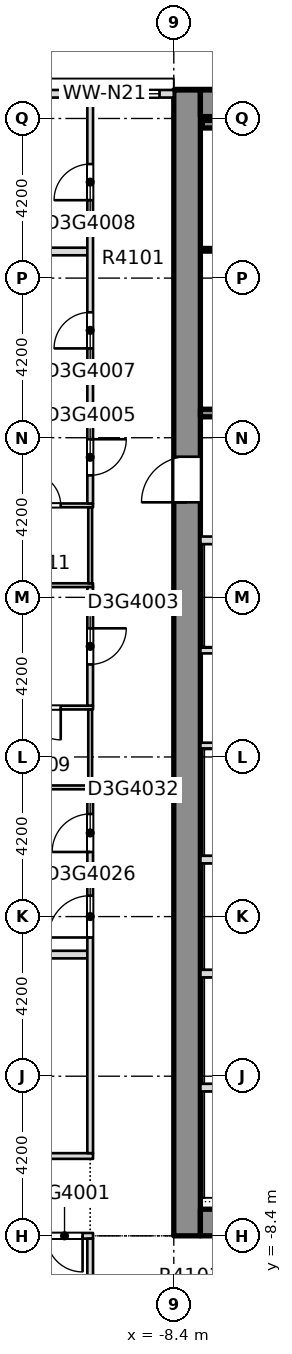
"""IFC4 building model, lengths in metres.
Left out: names, types, materials, properties, quantities, classifications, styles, units other than length and angle.
Written with IfcOpenShell. Run it as: python <this file> out.ifc"""

import sys

from ifc_helpers import new_model, si_unit, direction, frame, frame_2d, origin, place, context, subcontext, project, spatial, rectangle, extrude, element, fill, save


model = new_model("IFC4")
c1 = context("Model", 3, precision=1e-05, world=origin(), true_north=direction((0.0, 1.0)))
c2 = subcontext(c1, "Body", "Model", "MODEL_VIEW")
j1 = project(units=[si_unit("LENGTHUNIT", "METRE"), si_unit("PLANEANGLEUNIT", "RADIAN")], contexts=[c1])
p1 = place(None, origin())
s1 = spatial("IfcSite", under=j1, at=p1, CompositionType="ELEMENT")
p2 = place(p1, origin())
s2 = spatial("IfcBuilding", under=s1, at=p2, CompositionType="ELEMENT")
p3 = place(p2, frame((0.0, 0.0, 160.7)))
s3 = spatial("IfcBuildingStorey", under=s2, at=p3, CompositionType="ELEMENT", Elevation=160.7)
p4 = place(p3, frame((-8.05, -8.4, -0.4), z_axis=(0.0, 0.0, 1.0), x_axis=(0.0, 1.0, 0.0)))
e1 = element("IfcWall", 1, at=p4, inside=s3, PredefinedType="SOLIDWALL", context=c2, shape_type="SweptSolid", body=[
    extrude(rectangle(XDim=30.15, YDim=0.7, at=frame_2d((15.075, 0.0))), origin(), (0.0, 0.0, 1.0), 3.45),
])
p5 = place(p4, frame((19.3, 0.0, 0.4)))
e2 = element("IfcOpeningElement", 2, at=p5, cuts=e1, PredefinedType="OPENING", context=c2, shape_type="SweptSolid", body=[
    extrude(rectangle(XDim=1.2, YDim=2.1, at=frame_2d((0.6, 1.05))), frame((0.0, 0.36, 0.0), z_axis=(0.0, -1.0, 0.0), x_axis=(1.0, 0.0, 0.0)), (0.0, 0.0, 1.0), 0.72),
])
p6 = place(p3, frame((-7.7, -8.05, -0.4), z_axis=(0.0, 0.0, 1.0), x_axis=(1.0, 0.0, 0.0)))
e3 = element("IfcWall", 3, at=p6, inside=s3, PredefinedType="SHEAR", context=c2, shape_type="SweptSolid", body=[
    extrude(rectangle(XDim=15.4, YDim=0.7, at=frame_2d((7.7, 0.0))), origin(), (0.0, 0.0, 1.0), 3.45),
])
p7 = place(p6, frame((2.95, 0.0, 0.4)))
e4 = element("IfcOpeningElement", 4, at=p7, cuts=e3, PredefinedType="OPENING", context=c2, shape_type="SweptSolid", body=[
    extrude(rectangle(XDim=1.8, YDim=2.1, at=frame_2d((0.9, 1.05))), frame((0.0, 0.36, 0.0), z_axis=(0.0, -1.0, 0.0), x_axis=(1.0, 0.0, 0.0)), (0.0, 0.0, 1.0), 0.72),
])
p8 = place(p6, frame((10.65, 0.0, 0.4)))
e5 = element("IfcOpeningElement", 5, at=p8, cuts=e3, PredefinedType="OPENING", context=c2, shape_type="SweptSolid", body=[
    extrude(rectangle(XDim=1.8, YDim=2.1, at=frame_2d((0.9, 1.05))), frame((0.0, 0.36, 0.0), z_axis=(0.0, -1.0, 0.0), x_axis=(1.0, 0.0, 0.0)), (0.0, 0.0, 1.0), 0.72),
])
p9 = place(p3, frame((-7.7, 21.4, -0.4), z_axis=(0.0, 0.0, 1.0), x_axis=(1.0, 0.0, 0.0)))
e6 = element("IfcWall", 6, at=p9, inside=s3, PredefinedType="SHEAR", context=c2, shape_type="SweptSolid", body=[
    extrude(rectangle(XDim=15.4, YDim=0.7, at=frame_2d((7.7, 0.0))), origin(), (0.0, 0.0, 1.0), 3.45),
])
p10 = place(p3, frame((-21.55, -8.4, 0.0), z_axis=(0.0, 0.0, 1.0), x_axis=(1.0, 0.0, 0.0)))
e7 = element("IfcWall", 7, at=p10, inside=s3, PredefinedType="PARTITIONING", context=c2, shape_type="SweptSolid", body=[
    extrude(rectangle(XDim=11.025, YDim=0.15, at=frame_2d((5.513, 0.0))), origin(), (0.0, 0.0, 1.0), 3.05),
])
p11 = place(p10, frame((9.8, 0.0, 0.0)))
e8 = element("IfcOpeningElement", 8, at=p11, cuts=e7, PredefinedType="OPENING", context=c2, shape_type="SweptSolid", body=[
    extrude(rectangle(XDim=0.95, YDim=2.1, at=frame_2d((0.475, 1.05))), frame((0.0, 0.085, 0.0), z_axis=(0.0, -1.0, 0.0), x_axis=(1.0, 0.0, 0.0)), (0.0, 0.0, 1.0), 0.17),
])
p12 = place(p3, frame((-21.55, -6.3, 0.0), z_axis=(0.0, 0.0, 1.0), x_axis=(1.0, 0.0, 0.0)))
e9 = element("IfcWall", 9, at=p12, inside=s3, PredefinedType="PARTITIONING", context=c2, shape_type="SweptSolid", body=[
    extrude(rectangle(XDim=11.025, YDim=0.15, at=frame_2d((5.513, 0.0))), origin(), (0.0, 0.0, 1.0), 3.05),
])
p13 = place(p12, frame((1.75, 0.0, 0.0)))
e10 = element("IfcOpeningElement", 10, at=p13, cuts=e9, PredefinedType="OPENING", context=c2, shape_type="SweptSolid", body=[
    extrude(rectangle(XDim=1.0, YDim=2.1, at=frame_2d((0.5, 1.05))), frame((0.0, 0.085, 0.0), z_axis=(0.0, -1.0, 0.0), x_axis=(1.0, 0.0, 0.0)), (0.0, 0.0, 1.0), 0.17),
])
p14 = place(p12, frame((7.325, 0.0, 0.0)))
e11 = element("IfcOpeningElement", 11, at=p14, cuts=e9, PredefinedType="OPENING", context=c2, shape_type="SweptSolid", body=[
    extrude(rectangle(XDim=1.0, YDim=2.1, at=frame_2d((0.5, 1.05))), frame((0.0, 0.085, 0.0), z_axis=(0.0, -1.0, 0.0), x_axis=(1.0, 0.0, 0.0)), (0.0, 0.0, 1.0), 0.17),
])
for number, where, z_axis, x_axis in (
    (12, (-16.75, -1.0, 0.0), (0.0, 0.0, 1.0), (1.0, 0.0, 0.0)),
    (13, (-16.75, 1.0, 0.0), (0.0, 0.0, 1.0), (1.0, 0.0, 0.0)),
):
    element("IfcWall", number, at=place(p3, frame(where, z_axis=z_axis, x_axis=x_axis)), inside=s3, PredefinedType="PARTITIONING", context=c2, shape_type="SweptSolid", body=[
        extrude(rectangle(XDim=6.075, YDim=0.2, at=frame_2d((3.038, 0.0))), origin(), (0.0, 0.0, 1.0), 3.05),
    ])
p15 = place(p3, frame((-13.05, 3.4, 0.0), z_axis=(0.0, 0.0, 1.0), x_axis=(1.0, 0.0, 0.0)))
e14 = element("IfcWall", 14, at=p15, inside=s3, PredefinedType="PARTITIONING", context=c2, shape_type="SweptSolid", body=[
    extrude(rectangle(XDim=2.525, YDim=0.1, at=frame_2d((1.263, 0.0))), origin(), (0.0, 0.0, 1.0), 3.05),
])
p16 = place(p3, frame((-13.048, 5.5, 0.0), z_axis=(0.0, 0.0, 1.0), x_axis=(1.0, 0.0, 0.0)))
e15 = element("IfcWall", 15, at=p16, inside=s3, PredefinedType="PARTITIONING", context=c2, shape_type="SweptSolid", body=[
    extrude(rectangle(XDim=2.523, YDim=0.1, at=frame_2d((1.262, 0.0))), origin(), (0.0, 0.0, 1.0), 3.05),
])
p17 = place(p16, frame((0.823, 0.0, 0.0)))
e16 = element("IfcOpeningElement", 16, at=p17, cuts=e15, PredefinedType="OPENING", context=c2, shape_type="SweptSolid", body=[
    extrude(rectangle(XDim=0.85, YDim=2.1, at=frame_2d((0.425, 1.05))), frame((0.0, 0.06, 0.0), z_axis=(0.0, -1.0, 0.0), x_axis=(1.0, 0.0, 0.0)), (0.0, 0.0, 1.0), 0.12),
])
p18 = place(p3, frame((-13.05, 8.72, 0.0), z_axis=(0.0, 0.0, 1.0), x_axis=(1.0, 0.0, 0.0)))
e17 = element("IfcWall", 17, at=p18, inside=s3, PredefinedType="PARTITIONING", context=c2, shape_type="SweptSolid", body=[
    extrude(rectangle(XDim=2.525, YDim=0.1, at=frame_2d((1.263, 0.0))), origin(), (0.0, 0.0, 1.0), 3.05),
])
p19 = place(p3, frame((-13.05, 10.82, 0.0), z_axis=(0.0, 0.0, 1.0), x_axis=(1.0, 0.0, 0.0)))
e18 = element("IfcWall", 18, at=p19, inside=s3, PredefinedType="PARTITIONING", context=c2, shape_type="SweptSolid", body=[
    extrude(rectangle(XDim=2.525, YDim=0.1, at=frame_2d((1.263, 0.0))), origin(), (0.0, 0.0, 1.0), 3.05),
])
p20 = place(p19, frame((0.825, 0.0, 0.0)))
e19 = element("IfcOpeningElement", 19, at=p20, cuts=e18, PredefinedType="OPENING", context=c2, shape_type="SweptSolid", body=[
    extrude(rectangle(XDim=0.85, YDim=2.1, at=frame_2d((0.425, 1.05))), frame((0.0, 0.06, 0.0), z_axis=(0.0, -1.0, 0.0), x_axis=(1.0, 0.0, 0.0)), (0.0, 0.0, 1.0), 0.12),
])
for number, where, z_axis, x_axis in (
    (20, (-13.15, 13.35, 0.0), (0.0, 0.0, 1.0), (1.0, 0.0, 0.0)),
    (21, (-13.15, 17.5, 0.0), (0.0, 0.0, 1.0), (1.0, 0.0, 0.0)),
):
    element("IfcWall", number, at=place(p3, frame(where, z_axis=z_axis, x_axis=x_axis)), inside=s3, PredefinedType="PARTITIONING", context=c2, shape_type="SweptSolid", body=[
        extrude(rectangle(XDim=2.475, YDim=0.2, at=frame_2d((1.237, 0.0))), origin(), (0.0, 0.0, 1.0), 3.05),
    ])
p21 = place(p3, frame((-10.6, -10.4, 0.0), z_axis=(0.0, 0.0, 1.0), x_axis=(0.0, 1.0, 0.0)))
e22 = element("IfcWall", 22, at=p21, inside=s3, PredefinedType="PARTITIONING", context=c2, shape_type="SweptSolid", body=[
    extrude(rectangle(XDim=1.925, YDim=0.15, at=frame_2d((0.962, 0.0))), origin(), (0.0, 0.0, 1.0), 3.05),
])
p22 = place(p3, frame((-10.6, -6.225, 0.0), z_axis=(0.0, 0.0, 1.0), x_axis=(0.0, 1.0, 0.0)))
e23 = element("IfcWall", 23, at=p22, inside=s3, PredefinedType="PARTITIONING", context=c2, shape_type="SweptSolid", body=[
    extrude(rectangle(XDim=9.575, YDim=0.15, at=frame_2d((4.788, 0.0))), origin(), (0.0, 0.0, 1.0), 3.05),
])
p23 = place(p22, frame((5.675, 0.0, 0.0)))
e24 = element("IfcOpeningElement", 24, at=p23, cuts=e23, PredefinedType="OPENING", context=c2, shape_type="SweptSolid", body=[
    extrude(rectangle(XDim=1.1, YDim=2.1, at=frame_2d((0.55, 1.05))), frame((0.0, 0.085, 0.0), z_axis=(0.0, -1.0, 0.0), x_axis=(1.0, 0.0, 0.0)), (0.0, 0.0, 1.0), 0.17),
])
p24 = place(p22, frame((7.925, 0.0, 0.0)))
e25 = element("IfcOpeningElement", 25, at=p24, cuts=e23, PredefinedType="OPENING", context=c2, shape_type="SweptSolid", body=[
    extrude(rectangle(XDim=1.0, YDim=2.1, at=frame_2d((0.5, 1.05))), frame((0.0, 0.085, 0.0), z_axis=(0.0, -1.0, 0.0), x_axis=(1.0, 0.0, 0.0)), (0.0, 0.0, 1.0), 0.17),
])
p25 = place(p3, frame((-10.6, 3.45, 0.0), z_axis=(0.0, 0.0, 1.0), x_axis=(0.0, 1.0, 0.0)))
e26 = element("IfcWall", 26, at=p25, inside=s3, PredefinedType="PARTITIONING", context=c2, shape_type="SweptSolid", body=[
    extrude(rectangle(XDim=2.0, YDim=0.1, at=frame_2d((1.0, 0.0))), origin(), (0.0, 0.0, 1.0), 3.05),
])
p26 = place(p3, frame((-10.6, 5.55, 0.0), z_axis=(0.0, 0.0, 1.0), x_axis=(0.0, 1.0, 0.0)))
e27 = element("IfcWall", 27, at=p26, inside=s3, PredefinedType="PARTITIONING", context=c2, shape_type="SweptSolid", body=[
    extrude(rectangle(XDim=3.12, YDim=0.15, at=frame_2d((1.56, 0.0))), origin(), (0.0, 0.0, 1.0), 3.05),
])
p27 = place(p26, frame((1.085, 0.0, 0.0)))
e28 = element("IfcOpeningElement", 28, at=p27, cuts=e27, PredefinedType="OPENING", context=c2, shape_type="SweptSolid", body=[
    extrude(rectangle(XDim=0.95, YDim=2.1, at=frame_2d((0.475, 1.05))), frame((0.0, 0.085, 0.0), z_axis=(0.0, -1.0, 0.0), x_axis=(1.0, 0.0, 0.0)), (0.0, 0.0, 1.0), 0.17),
])
p28 = place(p3, frame((-10.6, 8.77, 0.0), z_axis=(0.0, 0.0, 1.0), x_axis=(0.0, 1.0, 0.0)))
e29 = element("IfcWall", 29, at=p28, inside=s3, PredefinedType="PARTITIONING", context=c2, shape_type="SweptSolid", body=[
    extrude(rectangle(XDim=2.0, YDim=0.1, at=frame_2d((1.0, 0.0))), origin(), (0.0, 0.0, 1.0), 3.05),
])
p29 = place(p3, frame((-10.6, 10.87, 0.0), z_axis=(0.0, 0.0, 1.0), x_axis=(0.0, 1.0, 0.0)))
e30 = element("IfcWall", 30, at=p29, inside=s3, PredefinedType="PARTITIONING", context=c2, shape_type="SweptSolid", body=[
    extrude(rectangle(XDim=10.68, YDim=0.15, at=frame_2d((5.34, 0.0))), origin(), (0.0, 0.0, 1.0), 3.05),
])
p30 = place(p29, frame((0.74, 0.0, 0.0)))
e31 = element("IfcOpeningElement", 31, at=p30, cuts=e30, PredefinedType="OPENING", context=c2, shape_type="SweptSolid", body=[
    extrude(rectangle(XDim=0.95, YDim=2.1, at=frame_2d((0.475, 1.05))), frame((0.0, 0.085, 0.0), z_axis=(0.0, -1.0, 0.0), x_axis=(1.0, 0.0, 0.0)), (0.0, 0.0, 1.0), 0.17),
])
p31 = place(p29, frame((4.08, 0.0, 0.0)))
e32 = element("IfcOpeningElement", 32, at=p31, cuts=e30, PredefinedType="OPENING", context=c2, shape_type="SweptSolid", body=[
    extrude(rectangle(XDim=0.95, YDim=2.1, at=frame_2d((0.475, 1.05))), frame((0.0, 0.085, 0.0), z_axis=(0.0, -1.0, 0.0), x_axis=(1.0, 0.0, 0.0)), (0.0, 0.0, 1.0), 0.17),
])
p32 = place(p29, frame((7.98, 0.0, 0.0)))
e33 = element("IfcOpeningElement", 33, at=p32, cuts=e30, PredefinedType="OPENING", context=c2, shape_type="SweptSolid", body=[
    extrude(rectangle(XDim=0.95, YDim=2.1, at=frame_2d((0.475, 1.05))), frame((0.0, 0.085, 0.0), z_axis=(0.0, -1.0, 0.0), x_axis=(1.0, 0.0, 0.0)), (0.0, 0.0, 1.0), 0.17),
])
p33 = place(p3, frame((-8.4, 21.65, 0.0), z_axis=(0.0, 0.0, 1.0), x_axis=(-1.0, 0.0, 0.0)))
e34 = element("IfcWall", 34, at=p33, inside=s3, PredefinedType="STANDARD", context=c2, shape_type="SweptSolid", body=[
    extrude(rectangle(XDim=3.65, YDim=0.2, at=frame_2d((1.825, 0.0))), origin(), (0.0, 0.0, 1.0), 3.05),
])
p34 = place(p33, frame((0.375, 0.0, 0.2)))
e35 = element("IfcOpeningElement", 35, at=p34, cuts=e34, PredefinedType="OPENING", context=c2, shape_type="SweptSolid", body=[
    extrude(rectangle(XDim=1.8, YDim=2.65, at=frame_2d((0.9, 1.325))), frame((0.0, 0.11, 0.0), z_axis=(0.0, -1.0, 0.0), x_axis=(1.0, 0.0, 0.0)), (0.0, 0.0, 1.0), 0.22),
])
for number, where, z_axis, x_axis in (
    (36, (-7.699, -4.5, 0.0), (0.0, 0.0, 1.0), (1.0, 0.0, 0.0)),
    (37, (-7.699, -1.5, 0.0), (0.0, 0.0, 1.0), (1.0, 0.0, 0.0)),
    (38, (-7.699, 1.5, 0.0), (0.0, 0.0, 1.0), (1.0, 0.0, 0.0)),
):
    element("IfcWall", number, at=place(p3, frame(where, z_axis=z_axis, x_axis=x_axis)), inside=s3, PredefinedType="PARTITIONING", context=c2, shape_type="SweptSolid", body=[
        extrude(rectangle(XDim=2.124, YDim=0.2, at=frame_2d((1.062, 0.0))), origin(), (0.0, 0.0, 1.0), 3.05),
    ])
p35 = place(p3, frame((-7.699, 4.5, 0.0), z_axis=(0.0, 0.0, 1.0), x_axis=(1.0, 0.0, 0.0)))
e39 = element("IfcWall", 39, at=p35, inside=s3, PredefinedType="PARTITIONING", context=c2, shape_type="SweptSolid", body=[
    extrude(rectangle(XDim=2.274, YDim=0.15, at=frame_2d((1.137, 0.0))), origin(), (0.0, 0.0, 1.0), 3.05),
])
p36 = place(p3, frame((-7.699, 7.0, 0.0), z_axis=(0.0, 0.0, 1.0), x_axis=(1.0, 0.0, 0.0)))
e40 = element("IfcWall", 40, at=p36, inside=s3, PredefinedType="PARTITIONING", context=c2, shape_type="SweptSolid", body=[
    extrude(rectangle(XDim=15.398, YDim=0.15, at=frame_2d((7.699, 0.0))), origin(), (0.0, 0.0, 1.0), 3.05),
])
p37 = place(p36, frame((6.999, 0.0, 0.0)))
e41 = element("IfcOpeningElement", 41, at=p37, cuts=e40, PredefinedType="OPENING", context=c2, shape_type="SweptSolid", body=[
    extrude(rectangle(XDim=1.4, YDim=2.1, at=frame_2d((0.7, 1.05))), frame((0.0, 0.085, 0.0), z_axis=(0.0, -1.0, 0.0), x_axis=(1.0, 0.0, 0.0)), (0.0, 0.0, 1.0), 0.17),
])
p38 = place(p3, frame((-7.699, 9.9, 0.0), z_axis=(0.0, 0.0, 1.0), x_axis=(1.0, 0.0, 0.0)))
e42 = element("IfcWall", 42, at=p38, inside=s3, PredefinedType="PARTITIONING", context=c2, shape_type="SweptSolid", body=[
    extrude(rectangle(XDim=4.099, YDim=0.2, at=frame_2d((2.049, 0.0))), origin(), (0.0, 0.0, 1.0), 3.05),
])
p39 = place(p38, frame((0.749, 0.0, 0.0)))
e43 = element("IfcOpeningElement", 43, at=p39, cuts=e42, PredefinedType="OPENING", context=c2, shape_type="SweptSolid", body=[
    extrude(rectangle(XDim=1.1, YDim=2.1, at=frame_2d((0.55, 1.05))), frame((0.0, 0.11, 0.0), z_axis=(0.0, -1.0, 0.0), x_axis=(1.0, 0.0, 0.0)), (0.0, 0.0, 1.0), 0.22),
])
p40 = place(p3, frame((-7.699, 13.25, 0.0), z_axis=(0.0, 0.0, 1.0), x_axis=(1.0, 0.0, 0.0)))
e44 = element("IfcWall", 44, at=p40, inside=s3, PredefinedType="SOLIDWALL", context=c2, shape_type="SweptSolid", body=[
    extrude(rectangle(XDim=4.274, YDim=0.2, at=frame_2d((2.137, 0.0))), origin(), (0.0, 0.0, 1.0), 3.05),
])
p41 = place(p40, frame((1.249, 0.0, 0.0)))
e45 = element("IfcOpeningElement", 45, at=p41, cuts=e44, PredefinedType="OPENING", context=c2, shape_type="SweptSolid", body=[
    extrude(rectangle(XDim=1.2, YDim=2.1, at=frame_2d((0.6, 1.05))), frame((0.0, 0.11, 0.0), z_axis=(0.0, -1.0, 0.0), x_axis=(1.0, 0.0, 0.0)), (0.0, 0.0, 1.0), 0.22),
])
p42 = place(p3, frame((-7.65, 20.85, 0.0), z_axis=(0.0, 0.0, 1.0), x_axis=(1.0, 0.0, 0.0)))
e46 = element("IfcWall", 46, at=p42, inside=s3, PredefinedType="SOLIDWALL", context=c2, shape_type="SweptSolid", body=[
    extrude(rectangle(XDim=3.5, YDim=0.2, at=frame_2d((1.75, 0.0))), origin(), (0.0, 0.0, 1.0), 3.05),
])
p43 = place(p11, origin())
e47 = element("IfcDoor", 47, at=p43, inside=s3, OperationType="SINGLE_SWING_RIGHT", PredefinedType="DOOR", context=c2, shape_type="SweptSolid", body=[
    extrude(rectangle(XDim=0.95, YDim=2.1, at=frame_2d((0.475, 1.05))), frame((0.0, 0.025, 0.0), z_axis=(0.0, -1.0, 0.0), x_axis=(1.0, 0.0, 0.0)), (0.0, 0.0, 1.0), 0.05),
])
fill(e8, e47)
p44 = place(p27, origin())
e48 = element("IfcDoor", 48, at=p44, inside=s3, OperationType="SINGLE_SWING_LEFT", PredefinedType="DOOR", context=c2, shape_type="SweptSolid", body=[
    extrude(rectangle(XDim=0.95, YDim=2.1, at=frame_2d((0.475, 1.05))), frame((0.0, 0.025, 0.0), z_axis=(0.0, -1.0, 0.0), x_axis=(1.0, 0.0, 0.0)), (0.0, 0.0, 1.0), 0.05),
])
fill(e28, e48)
p45 = place(p17, origin())
e49 = element("IfcDoor", 49, at=p45, inside=s3, OperationType="SINGLE_SWING_RIGHT", PredefinedType="DOOR", context=c2, shape_type="SweptSolid", body=[
    extrude(rectangle(XDim=0.85, YDim=2.1, at=frame_2d((0.425, 1.05))), frame((0.0, 0.025, 0.0), z_axis=(0.0, -1.0, 0.0), x_axis=(1.0, 0.0, 0.0)), (0.0, 0.0, 1.0), 0.05),
])
fill(e16, e49)
p46 = place(p30, origin())
e50 = element("IfcDoor", 50, at=p46, inside=s3, OperationType="SINGLE_SWING_LEFT", PredefinedType="DOOR", context=c2, shape_type="SweptSolid", body=[
    extrude(rectangle(XDim=0.95, YDim=2.1, at=frame_2d((0.475, 1.05))), frame((0.0, 0.025, 0.0), z_axis=(0.0, -1.0, 0.0), x_axis=(1.0, 0.0, 0.0)), (0.0, 0.0, 1.0), 0.05),
])
fill(e31, e50)
p47 = place(p20, origin())
e51 = element("IfcDoor", 51, at=p47, inside=s3, OperationType="SINGLE_SWING_RIGHT", PredefinedType="DOOR", context=c2, shape_type="SweptSolid", body=[
    extrude(rectangle(XDim=0.85, YDim=2.1, at=frame_2d((0.425, 1.05))), frame((0.0, 0.025, 0.0), z_axis=(0.0, -1.0, 0.0), x_axis=(1.0, 0.0, 0.0)), (0.0, 0.0, 1.0), 0.05),
])
fill(e19, e51)
p48 = place(p31, origin())
e52 = element("IfcDoor", 52, at=p48, inside=s3, OperationType="SINGLE_SWING_LEFT", PredefinedType="DOOR", context=c2, shape_type="SweptSolid", body=[
    extrude(rectangle(XDim=0.95, YDim=2.1, at=frame_2d((0.475, 1.05))), frame((0.0, 0.025, 0.0), z_axis=(0.0, -1.0, 0.0), x_axis=(1.0, 0.0, 0.0)), (0.0, 0.0, 1.0), 0.05),
])
fill(e32, e52)
p49 = place(p32, origin())
e53 = element("IfcDoor", 53, at=p49, inside=s3, OperationType="SINGLE_SWING_RIGHT", PredefinedType="DOOR", context=c2, shape_type="SweptSolid", body=[
    extrude(rectangle(XDim=0.95, YDim=2.1, at=frame_2d((0.475, 1.05))), frame((0.0, 0.025, 0.0), z_axis=(0.0, -1.0, 0.0), x_axis=(1.0, 0.0, 0.0)), (0.0, 0.0, 1.0), 0.05),
])
fill(e33, e53)
p50 = place(p23, origin())
e54 = element("IfcDoor", 54, at=p50, inside=s3, OperationType="SINGLE_SWING_RIGHT", PredefinedType="DOOR", context=c2, shape_type="SweptSolid", body=[
    extrude(rectangle(XDim=1.1, YDim=2.1, at=frame_2d((0.55, 1.05))), frame((0.0, 0.025, 0.0), z_axis=(0.0, -1.0, 0.0), x_axis=(1.0, 0.0, 0.0)), (0.0, 0.0, 1.0), 0.05),
])
fill(e24, e54)
p51 = place(p24, origin())
e55 = element("IfcDoor", 55, at=p51, inside=s3, OperationType="SINGLE_SWING_LEFT", PredefinedType="DOOR", context=c2, shape_type="SweptSolid", body=[
    extrude(rectangle(XDim=1.0, YDim=2.1, at=frame_2d((0.5, 1.05))), frame((0.0, 0.025, 0.0), z_axis=(0.0, -1.0, 0.0), x_axis=(1.0, 0.0, 0.0)), (0.0, 0.0, 1.0), 0.05),
])
fill(e25, e55)
p52 = place(p34, origin())
e56 = element("IfcWindow", 56, at=p52, inside=s3, PartitioningType="SINGLE_PANEL", PredefinedType="WINDOW", context=c2, shape_type="SweptSolid", body=[
    extrude(rectangle(XDim=1.8, YDim=2.65, at=frame_2d((0.9, 1.325))), frame((0.0, 0.03, 0.0), z_axis=(0.0, -1.0, 0.0), x_axis=(1.0, 0.0, 0.0)), (0.0, 0.0, 1.0), 0.06),
])
fill(e35, e56)
p53 = place(p5, origin())
e57 = element("IfcDoor", 57, at=p53, inside=s3, OperationType="SINGLE_SWING_LEFT", PredefinedType="DOOR", context=c2, shape_type="SweptSolid", body=[
    extrude(rectangle(XDim=1.2, YDim=2.1, at=frame_2d((0.6, 1.05))), frame((0.0, 0.025, 0.0), z_axis=(0.0, -1.0, 0.0), x_axis=(1.0, 0.0, 0.0)), (0.0, 0.0, 1.0), 0.05),
])
fill(e2, e57)
save(model, sys.argv[1])
